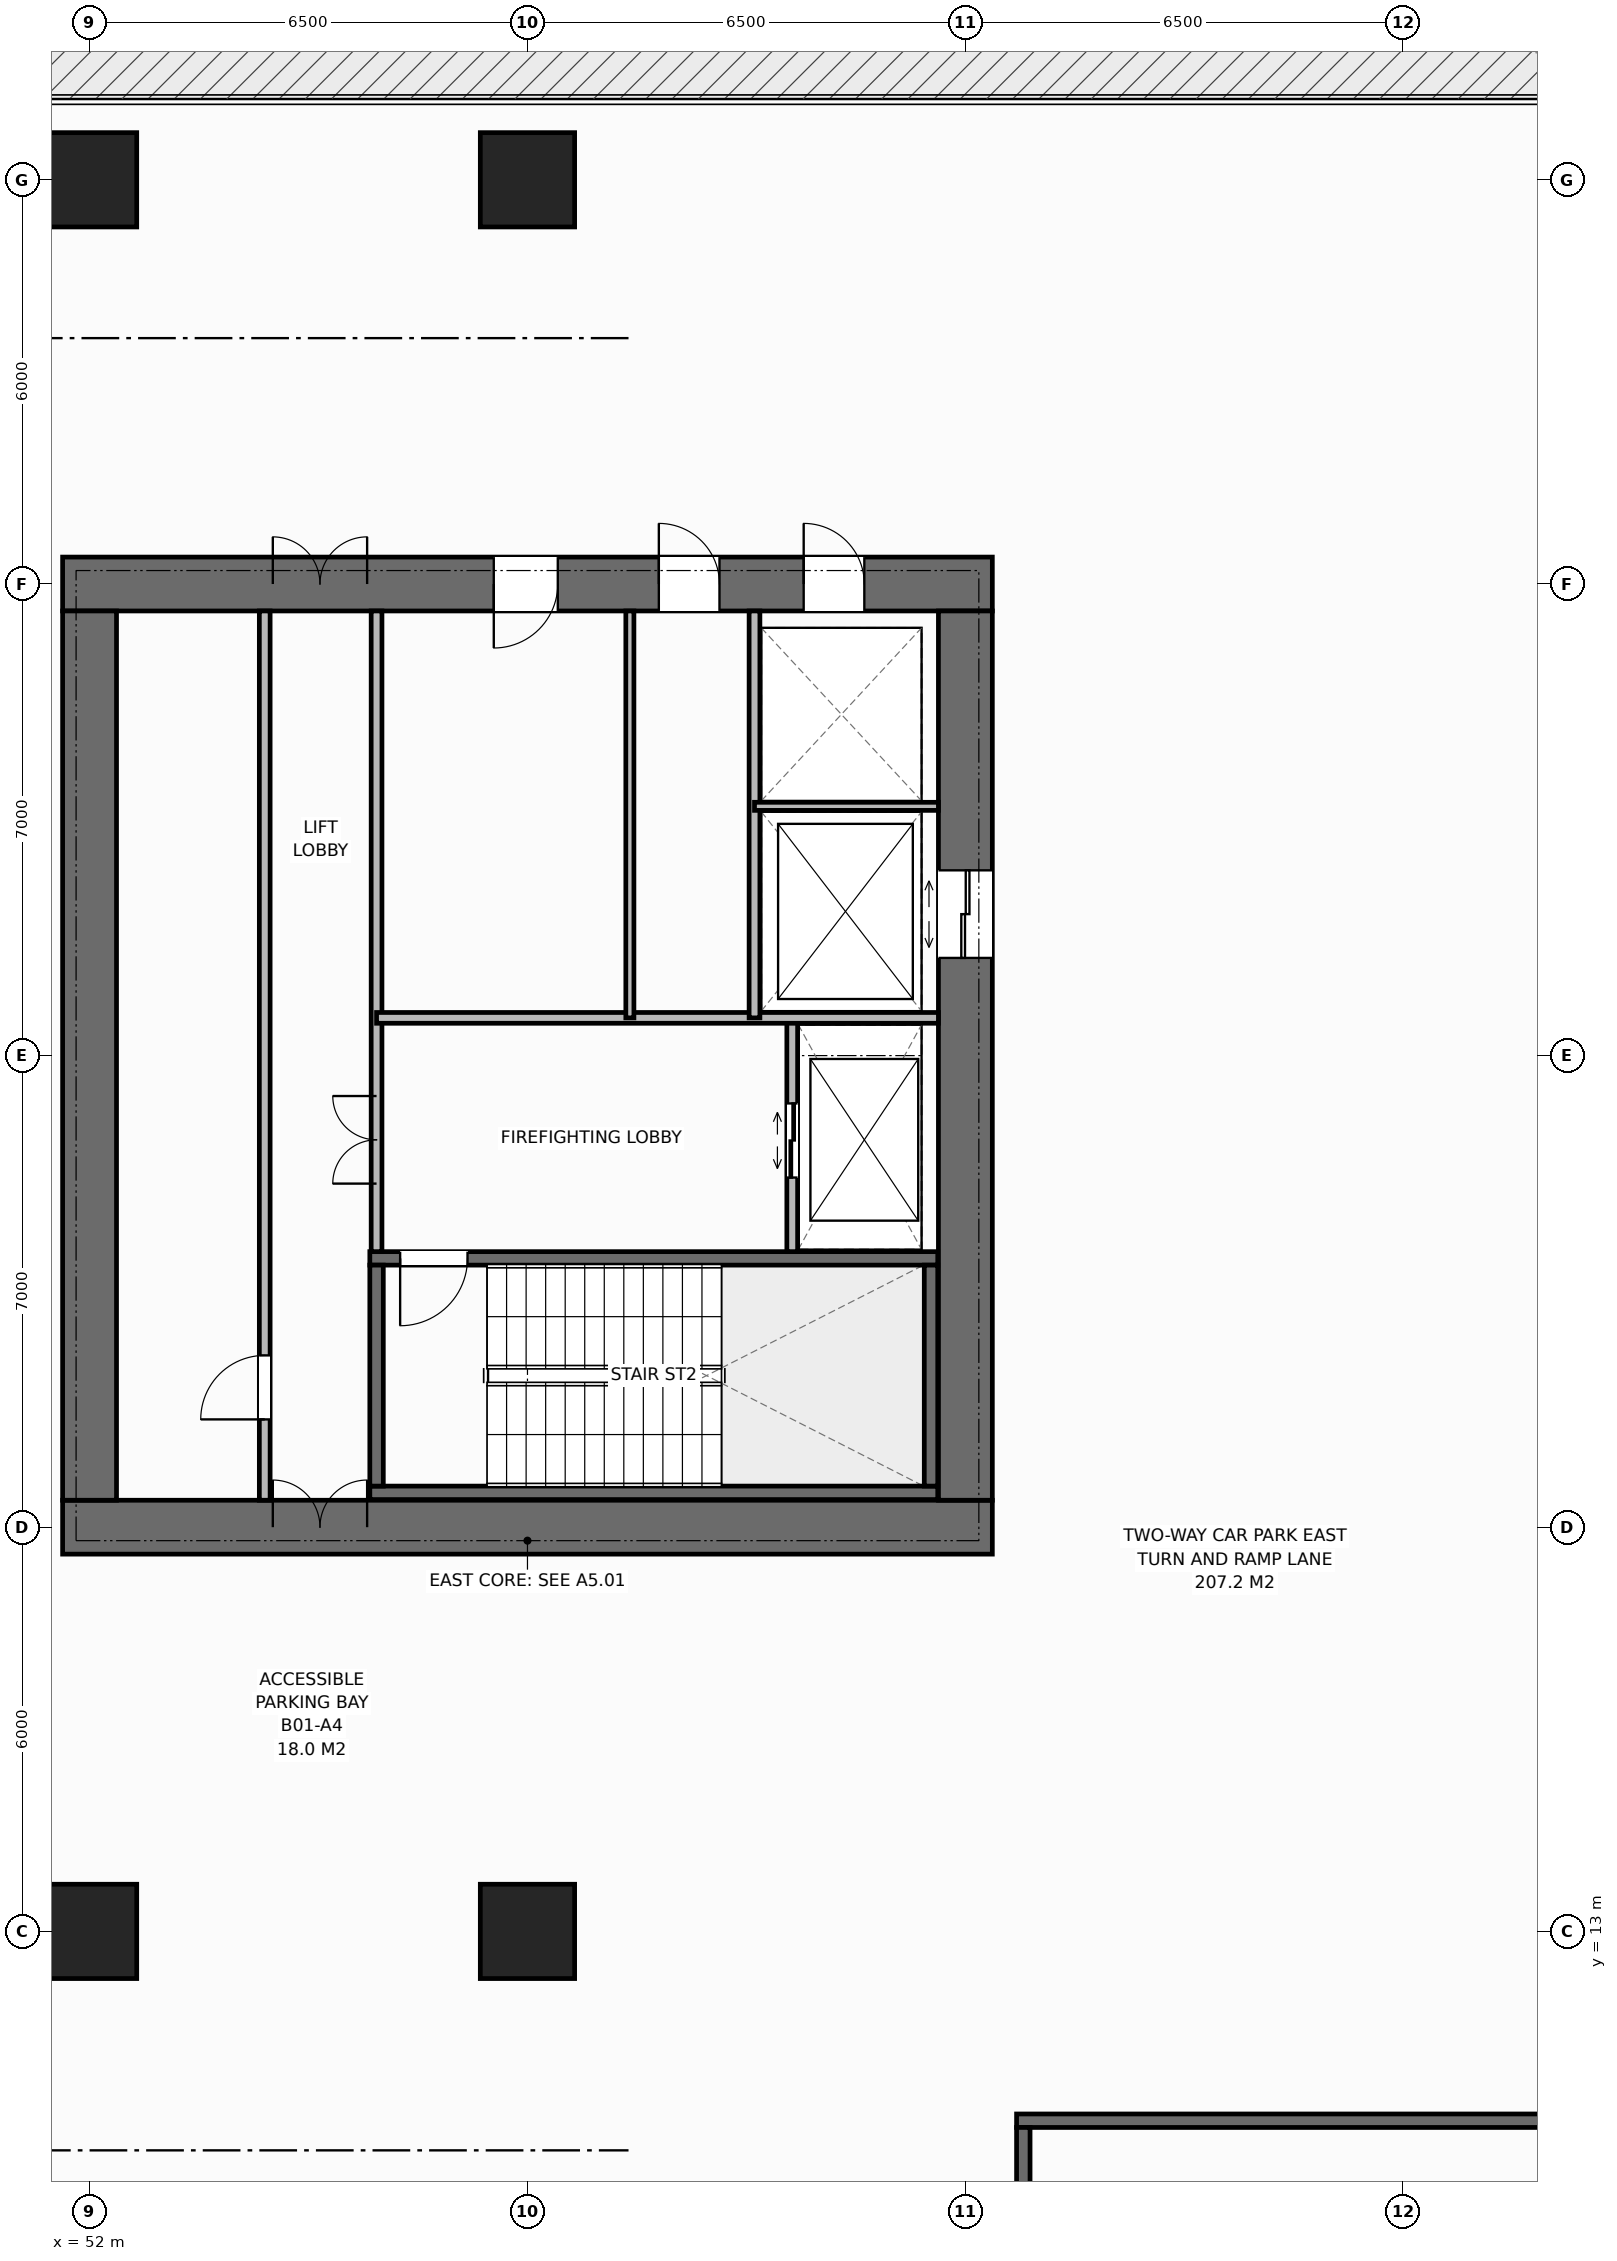
"""IFC4 building model, lengths in metres.
Left out: names, types, materials, properties, quantities, classifications, styles, units other than length and angle.
Written with IfcOpenShell. Run it as: python <this file> out.ifc"""

import sys

from ifc_helpers import new_model, si_unit, direction, frame, frame_2d, origin, origin_2d, place, context, subcontext, project, spatial, rectangle, extrude, element, fill, save


model = new_model("IFC4")
c1 = context("Model", 3, precision=1e-05, world=origin(), true_north=direction((0.0, 1.0)))
c2 = subcontext(c1, "Body", "Model", "MODEL_VIEW")
j1 = project(units=[si_unit("LENGTHUNIT", "METRE"), si_unit("PLANEANGLEUNIT", "RADIAN")], contexts=[c1])
p1 = place(None, origin())
s1 = spatial("IfcSite", under=j1, at=p1, CompositionType="ELEMENT")
p2 = place(p1, origin())
s2 = spatial("IfcBuilding", under=s1, at=p2, CompositionType="ELEMENT")
p3 = place(p2, frame((0.0, 0.0, -4.5)))
s3 = spatial("IfcBuildingStorey", under=s2, at=p3, CompositionType="ELEMENT", Elevation=-4.5)
p4 = place(p3, frame((51.6, 19.0, 0.0), z_axis=(0.0, 0.0, 1.0), x_axis=(1.0, 0.0, 0.0)))
e1 = element("IfcWall", 1, at=p4, inside=s3, PredefinedType="SHEAR", context=c2, shape_type="SweptSolid", body=[
    extrude(rectangle(XDim=13.8, YDim=0.8, at=frame_2d((6.9, 0.0))), origin(), (0.0, 0.0, 1.0), 4.5),
])
p5 = place(p4, frame((3.12, 0.0, 0.0)))
e2 = element("IfcOpeningElement", 2, at=p5, cuts=e1, PredefinedType="OPENING", context=c2, shape_type="SweptSolid", body=[
    extrude(rectangle(XDim=1.4, YDim=2.2, at=frame_2d((0.7, 1.1))), frame((0.0, 0.41, 0.0), z_axis=(0.0, -1.0, 0.0), x_axis=(1.0, 0.0, 0.0)), (0.0, 0.0, 1.0), 0.82),
])
p6 = place(p3, frame((51.6, 33.0, 0.0), z_axis=(0.0, 0.0, 1.0), x_axis=(1.0, 0.0, 0.0)))
e3 = element("IfcWall", 3, at=p6, inside=s3, PredefinedType="SHEAR", context=c2, shape_type="SweptSolid", body=[
    extrude(rectangle(XDim=13.8, YDim=0.8, at=frame_2d((6.9, 0.0))), origin(), (0.0, 0.0, 1.0), 4.5),
])
p7 = place(p6, frame((3.12, 0.0, 0.0)))
e4 = element("IfcOpeningElement", 4, at=p7, cuts=e3, PredefinedType="OPENING", context=c2, shape_type="SweptSolid", body=[
    extrude(rectangle(XDim=1.4, YDim=2.2, at=frame_2d((0.7, 1.1))), frame((0.0, 0.41, 0.0), z_axis=(0.0, -1.0, 0.0), x_axis=(1.0, 0.0, 0.0)), (0.0, 0.0, 1.0), 0.82),
])
p8 = place(p6, frame((11.0, 0.0, 0.0)))
e5 = element("IfcOpeningElement", 5, at=p8, cuts=e3, PredefinedType="OPENING", context=c2, shape_type="SweptSolid", body=[
    extrude(rectangle(XDim=0.9, YDim=2.15, at=frame_2d((0.45, 1.075))), frame((0.0, 0.41, 0.0), z_axis=(0.0, -1.0, 0.0), x_axis=(1.0, 0.0, 0.0)), (0.0, 0.0, 1.0), 0.82),
])
p9 = place(p6, frame((6.4, 0.0, 0.0)))
e6 = element("IfcOpeningElement", 6, at=p9, cuts=e3, PredefinedType="OPENING", context=c2, shape_type="SweptSolid", body=[
    extrude(rectangle(XDim=0.95, YDim=2.15, at=frame_2d((0.475, 1.075))), frame((0.0, 0.41, 0.0), z_axis=(0.0, -1.0, 0.0), x_axis=(1.0, 0.0, 0.0)), (0.0, 0.0, 1.0), 0.82),
])
p10 = place(p6, frame((8.85, 0.0, 0.0)))
e7 = element("IfcOpeningElement", 7, at=p10, cuts=e3, PredefinedType="OPENING", context=c2, shape_type="SweptSolid", body=[
    extrude(rectangle(XDim=0.9, YDim=2.15, at=frame_2d((0.45, 1.075))), frame((0.0, 0.41, 0.0), z_axis=(0.0, -1.0, 0.0), x_axis=(1.0, 0.0, 0.0)), (0.0, 0.0, 1.0), 0.82),
])
p11 = place(p3, frame((52.0, 19.4, 0.0), z_axis=(0.0, 0.0, 1.0), x_axis=(0.0, 1.0, 0.0)))
e8 = element("IfcWall", 8, at=p11, inside=s3, PredefinedType="SHEAR", context=c2, shape_type="SweptSolid", body=[
    extrude(rectangle(XDim=13.2, YDim=0.8, at=frame_2d((6.6, 0.0))), origin(), (0.0, 0.0, 1.0), 4.5),
])
p12 = place(p3, frame((65.0, 19.4, 0.0), z_axis=(0.0, 0.0, 1.0), x_axis=(0.0, 1.0, 0.0)))
e9 = element("IfcWall", 9, at=p12, inside=s3, PredefinedType="SHEAR", context=c2, shape_type="SweptSolid", body=[
    extrude(rectangle(XDim=13.2, YDim=0.8, at=frame_2d((6.6, 0.0))), origin(), (0.0, 0.0, 1.0), 4.5),
])
p13 = place(p12, frame((8.05, 0.0, 0.0)))
e10 = element("IfcOpeningElement", 10, at=p13, cuts=e9, PredefinedType="OPENING", context=c2, shape_type="SweptSolid", body=[
    extrude(rectangle(XDim=1.3, YDim=2.2, at=frame_2d((0.65, 1.1))), frame((0.0, 0.41, 0.0), z_axis=(0.0, -1.0, 0.0), x_axis=(1.0, 0.0, 0.0)), (0.0, 0.0, 1.0), 0.82),
])
p14 = place(p3, frame((56.16, 19.51, 0.0), z_axis=(0.0, 0.0, 1.0), x_axis=(1.0, 0.0, 0.0)))
e11 = element("IfcWall", 11, at=p14, inside=s3, PredefinedType="SHEAR", context=c2, shape_type="SweptSolid", body=[
    extrude(rectangle(XDim=8.43, YDim=0.2, at=frame_2d((4.215, 0.0))), origin(), (0.0, 0.0, 1.0), 4.5),
])
p15 = place(p3, frame((56.16, 22.99, 0.0), z_axis=(0.0, 0.0, 1.0), x_axis=(1.0, 0.0, 0.0)))
e12 = element("IfcWall", 12, at=p15, inside=s3, PredefinedType="SHEAR", context=c2, shape_type="SweptSolid", body=[
    extrude(rectangle(XDim=8.43, YDim=0.2, at=frame_2d((4.215, 0.0))), origin(), (0.0, 0.0, 1.0), 4.5),
])
p16 = place(p15, frame((0.45, 0.0, 0.0)))
e13 = element("IfcOpeningElement", 13, at=p16, cuts=e12, PredefinedType="OPENING", context=c2, shape_type="SweptSolid", body=[
    extrude(rectangle(XDim=1.0, YDim=2.15, at=frame_2d((0.5, 1.075))), frame((0.0, 0.11, 0.0), z_axis=(0.0, -1.0, 0.0), x_axis=(1.0, 0.0, 0.0)), (0.0, 0.0, 1.0), 0.22),
])
for number, where, z_axis, x_axis in (
    (14, (56.26, 19.61, 0.0), (0.0, 0.0, 1.0), (0.0, 1.0, 0.0)),
    (15, (64.49, 19.61, 0.0), (0.0, 0.0, 1.0), (0.0, 1.0, 0.0)),
):
    element("IfcWall", number, at=place(p3, frame(where, z_axis=z_axis, x_axis=x_axis)), inside=s3, PredefinedType="SHEAR", context=c2, shape_type="SweptSolid", body=[
        extrude(rectangle(XDim=3.28, YDim=0.2, at=frame_2d((1.64, 0.0))), origin(), (0.0, 0.0, 1.0), 4.5),
    ])
p17 = place(p3, frame((65.76, 10.19, 0.0), z_axis=(0.0, 0.0, 1.0), x_axis=(1.0, 0.0, 0.0)))
e16 = element("IfcWall", 16, at=p17, inside=s3, PredefinedType="SHEAR", context=c2, shape_type="SweptSolid", body=[
    extrude(rectangle(XDim=8.43, YDim=0.2, at=frame_2d((4.215, 0.0))), origin(), (0.0, 0.0, 1.0), 4.5),
])
p18 = place(p3, frame((65.86, 6.81, 0.0), z_axis=(0.0, 0.0, 1.0), x_axis=(0.0, 1.0, 0.0)))
e17 = element("IfcWall", 17, at=p18, inside=s3, PredefinedType="SHEAR", context=c2, shape_type="SweptSolid", body=[
    extrude(rectangle(XDim=3.28, YDim=0.2, at=frame_2d((1.64, 0.0))), origin(), (0.0, 0.0, 1.0), 4.5),
])
for number, where, z_axis, x_axis in (
    (18, (58.5, 13.0, 0.0), (0.0, 0.0, 1.0), (1.0, 0.0, 0.0)),
    (19, (58.5, 39.0, 0.0), (0.0, 0.0, 1.0), (1.0, 0.0, 0.0)),
    (20, (52.0, 13.0, 0.0), (0.0, 0.0, 1.0), (1.0, 0.0, 0.0)),
    (21, (52.0, 39.0, 0.0), (0.0, 0.0, 1.0), (1.0, 0.0, 0.0)),
):
    element("IfcColumn", number, at=place(p3, frame(where, z_axis=z_axis, x_axis=x_axis)), inside=s3, PredefinedType="COLUMN", context=c2, shape_type="SweptSolid", body=[
        extrude(rectangle(XDim=1.4, YDim=1.4, at=origin_2d()), origin(), (0.0, 0.0, 1.0), 4.5),
    ])
p19 = place(p3, frame((54.6, 19.4, 0.0), z_axis=(0.0, 0.0, 1.0), x_axis=(0.0, 1.0, 0.0)))
e22 = element("IfcWall", 22, at=p19, inside=s3, PredefinedType="STANDARD", context=c2, shape_type="SweptSolid", body=[
    extrude(rectangle(XDim=13.2, YDim=0.16, at=frame_2d((6.6, 0.0))), origin(), (0.0, 0.0, 1.0), 4.22),
])
p20 = place(p19, frame((1.2, 0.0, 0.0)))
e23 = element("IfcOpeningElement", 23, at=p20, cuts=e22, PredefinedType="OPENING", context=c2, shape_type="SweptSolid", body=[
    extrude(rectangle(XDim=0.95, YDim=2.15, at=frame_2d((0.475, 1.075))), frame((0.0, 0.09, 0.0), z_axis=(0.0, -1.0, 0.0), x_axis=(1.0, 0.0, 0.0)), (0.0, 0.0, 1.0), 0.18),
])
p21 = place(p3, frame((56.26, 23.09, 0.0), z_axis=(0.0, 0.0, 1.0), x_axis=(0.0, 1.0, 0.0)))
e24 = element("IfcWall", 24, at=p21, inside=s3, PredefinedType="STANDARD", context=c2, shape_type="SweptSolid", body=[
    extrude(rectangle(XDim=9.51, YDim=0.16, at=frame_2d((4.755, 0.0))), origin(), (0.0, 0.0, 1.0), 4.22),
])
p22 = place(p21, frame((1.01, 0.0, 0.0)))
e25 = element("IfcOpeningElement", 25, at=p22, cuts=e24, PredefinedType="OPENING", context=c2, shape_type="SweptSolid", body=[
    extrude(rectangle(XDim=1.3, YDim=2.2, at=frame_2d((0.65, 1.1))), frame((0.0, 0.09, 0.0), z_axis=(0.0, -1.0, 0.0), x_axis=(1.0, 0.0, 0.0)), (0.0, 0.0, 1.0), 0.18),
])
p23 = place(p3, frame((62.43, 23.09, 0.0), z_axis=(0.0, 0.0, 1.0), x_axis=(0.0, 1.0, 0.0)))
e26 = element("IfcWall", 26, at=p23, inside=s3, PredefinedType="STANDARD", context=c2, shape_type="SweptSolid", body=[
    extrude(rectangle(XDim=3.47, YDim=0.16, at=frame_2d((1.735, 0.0))), origin(), (0.0, 0.0, 1.0), 4.22),
])
p24 = place(p23, frame((1.1, 0.0, 0.0)))
e27 = element("IfcOpeningElement", 27, at=p24, cuts=e26, PredefinedType="OPENING", context=c2, shape_type="SweptSolid", body=[
    extrude(rectangle(XDim=1.1, YDim=2.2, at=frame_2d((0.55, 1.1))), frame((0.0, 0.09, 0.0), z_axis=(0.0, -1.0, 0.0), x_axis=(1.0, 0.0, 0.0)), (0.0, 0.0, 1.0), 0.18),
])
p25 = place(p3, frame((56.26, 26.56, 0.0), z_axis=(0.0, 0.0, 1.0), x_axis=(1.0, 0.0, 0.0)))
e28 = element("IfcWall", 28, at=p25, inside=s3, PredefinedType="STANDARD", context=c2, shape_type="SweptSolid", body=[
    extrude(rectangle(XDim=8.34, YDim=0.16, at=frame_2d((4.17, 0.0))), origin(), (0.0, 0.0, 1.0), 4.22),
])
p26 = place(p3, frame((61.87, 26.56, 0.0), z_axis=(0.0, 0.0, 1.0), x_axis=(0.0, 1.0, 0.0)))
e29 = element("IfcWall", 29, at=p26, inside=s3, PredefinedType="STANDARD", context=c2, shape_type="SweptSolid", body=[
    extrude(rectangle(XDim=6.04, YDim=0.16, at=frame_2d((3.02, 0.0))), origin(), (0.0, 0.0, 1.0), 4.22),
])
p27 = place(p3, frame((61.87, 29.7, 0.0), z_axis=(0.0, 0.0, 1.0), x_axis=(1.0, 0.0, 0.0)))
e30 = element("IfcWall", 30, at=p27, inside=s3, PredefinedType="PARTITIONING", context=c2, shape_type="SweptSolid", body=[
    extrude(rectangle(XDim=2.73, YDim=0.12, at=frame_2d((1.365, 0.0))), origin(), (0.0, 0.0, 1.0), 4.22),
])
p28 = place(p3, frame((60.02, 26.56, 0.0), z_axis=(0.0, 0.0, 1.0), x_axis=(0.0, 1.0, 0.0)))
e31 = element("IfcWall", 31, at=p28, inside=s3, PredefinedType="PARTITIONING", context=c2, shape_type="SweptSolid", body=[
    extrude(rectangle(XDim=6.04, YDim=0.12, at=frame_2d((3.02, 0.0))), origin(), (0.0, 0.0, 1.0), 4.22),
])
p29 = place(p5, origin())
e32 = element("IfcDoor", 32, at=p29, inside=s3, OperationType="DOUBLE_DOOR_SINGLE_SWING", PredefinedType="DOOR", context=c2, shape_type="SweptSolid", body=[
    extrude(rectangle(XDim=1.4, YDim=2.2, at=frame_2d((0.7, 1.1))), frame((0.0, 0.125, 0.0), z_axis=(0.0, -1.0, 0.0), x_axis=(1.0, 0.0, 0.0)), (0.0, 0.0, 1.0), 0.05),
])
fill(e2, e32)
p30 = place(p7, origin())
e33 = element("IfcDoor", 33, at=p30, inside=s3, OperationType="DOUBLE_DOOR_SINGLE_SWING", PredefinedType="DOOR", context=c2, shape_type="SweptSolid", body=[
    extrude(rectangle(XDim=1.4, YDim=2.2, at=frame_2d((0.7, 1.1))), frame((0.0, -0.075, 0.0), z_axis=(0.0, -1.0, 0.0), x_axis=(1.0, 0.0, 0.0)), (0.0, 0.0, 1.0), 0.05),
])
fill(e4, e33)
p31 = place(p20, origin())
e34 = element("IfcDoor", 34, at=p31, inside=s3, OperationType="SINGLE_SWING_LEFT", PredefinedType="DOOR", context=c2, shape_type="SweptSolid", body=[
    extrude(rectangle(XDim=0.95, YDim=2.15, at=frame_2d((0.475, 1.075))), frame((0.0, 0.025, 0.0), z_axis=(0.0, -1.0, 0.0), x_axis=(1.0, 0.0, 0.0)), (0.0, 0.0, 1.0), 0.05),
])
fill(e23, e34)
p32 = place(p16, origin())
e35 = element("IfcDoor", 35, at=p32, inside=s3, OperationType="SINGLE_SWING_RIGHT", PredefinedType="DOOR", context=c2, shape_type="SweptSolid", body=[
    extrude(rectangle(XDim=1.0, YDim=2.15, at=frame_2d((0.5, 1.075))), frame((0.0, 0.025, 0.0), z_axis=(0.0, -1.0, 0.0), x_axis=(1.0, 0.0, 0.0)), (0.0, 0.0, 1.0), 0.05),
])
fill(e13, e35)
p33 = place(p24, origin())
e36 = element("IfcDoor", 36, at=p33, inside=s3, OperationType="DOUBLE_DOOR_SLIDING", PredefinedType="DOOR", context=c2, shape_type="SweptSolid", body=[
    extrude(rectangle(XDim=1.1, YDim=2.2, at=frame_2d((0.55, 1.1))), frame((0.0, 0.025, 0.0), z_axis=(0.0, -1.0, 0.0), x_axis=(1.0, 0.0, 0.0)), (0.0, 0.0, 1.0), 0.05),
])
fill(e27, e36)
p34 = place(p22, origin())
e37 = element("IfcDoor", 37, at=p34, inside=s3, OperationType="DOUBLE_DOOR_SINGLE_SWING", PredefinedType="DOOR", context=c2, shape_type="SweptSolid", body=[
    extrude(rectangle(XDim=1.3, YDim=2.2, at=frame_2d((0.65, 1.1))), frame((0.0, 0.025, 0.0), z_axis=(0.0, -1.0, 0.0), x_axis=(1.0, 0.0, 0.0)), (0.0, 0.0, 1.0), 0.05),
])
fill(e25, e37)
p35 = place(p13, origin())
e38 = element("IfcDoor", 38, at=p35, inside=s3, OperationType="DOUBLE_DOOR_SLIDING", PredefinedType="DOOR", context=c2, shape_type="SweptSolid", body=[
    extrude(rectangle(XDim=1.3, YDim=2.2, at=frame_2d((0.65, 1.1))), frame((0.0, 0.025, 0.0), z_axis=(0.0, -1.0, 0.0), x_axis=(1.0, 0.0, 0.0)), (0.0, 0.0, 1.0), 0.05),
])
fill(e10, e38)
p36 = place(p8, origin())
e39 = element("IfcDoor", 39, at=p36, inside=s3, OperationType="SINGLE_SWING_LEFT", PredefinedType="DOOR", context=c2, shape_type="SweptSolid", body=[
    extrude(rectangle(XDim=0.9, YDim=2.15, at=frame_2d((0.45, 1.075))), frame((0.0, -0.075, 0.0), z_axis=(0.0, -1.0, 0.0), x_axis=(1.0, 0.0, 0.0)), (0.0, 0.0, 1.0), 0.05),
])
fill(e5, e39)
p37 = place(p9, origin())
e40 = element("IfcDoor", 40, at=p37, inside=s3, OperationType="SINGLE_SWING_RIGHT", PredefinedType="DOOR", context=c2, shape_type="SweptSolid", body=[
    extrude(rectangle(XDim=0.95, YDim=2.15, at=frame_2d((0.475, 1.075))), frame((0.0, -0.075, 0.0), z_axis=(0.0, -1.0, 0.0), x_axis=(1.0, 0.0, 0.0)), (0.0, 0.0, 1.0), 0.05),
])
fill(e6, e40)
p38 = place(p10, origin())
e41 = element("IfcDoor", 41, at=p38, inside=s3, OperationType="SINGLE_SWING_LEFT", PredefinedType="DOOR", context=c2, shape_type="SweptSolid", body=[
    extrude(rectangle(XDim=0.9, YDim=2.15, at=frame_2d((0.45, 1.075))), frame((0.0, -0.075, 0.0), z_axis=(0.0, -1.0, 0.0), x_axis=(1.0, 0.0, 0.0)), (0.0, 0.0, 1.0), 0.05),
])
fill(e7, e41)
save(model, sys.argv[1])
